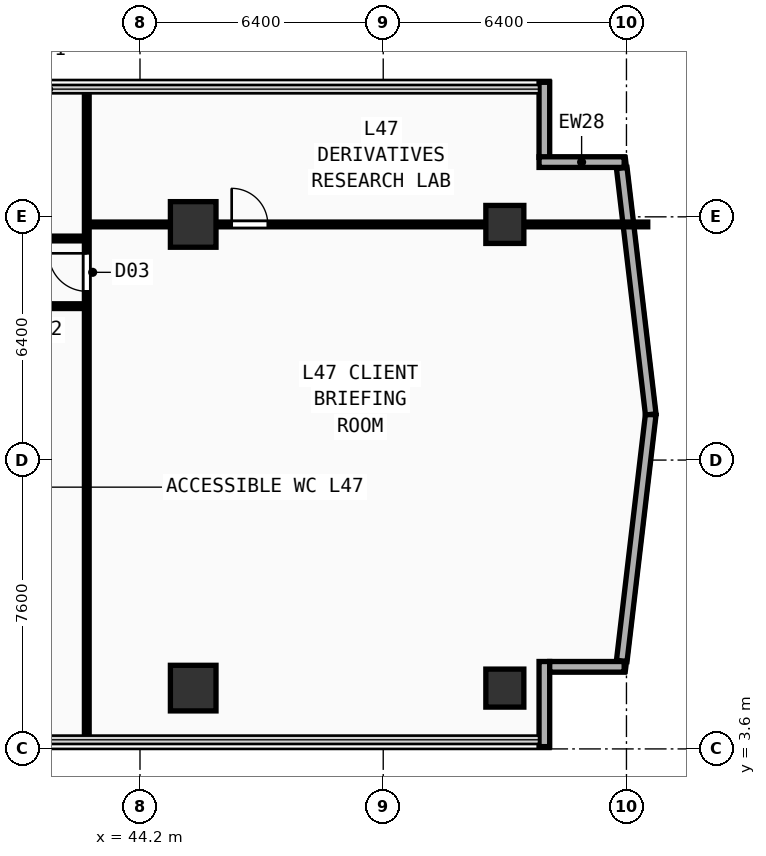
"""IFC4 building model, lengths in metres.
Left out: names, types, materials, properties, quantities, classifications, styles, units other than length and angle.
Written with IfcOpenShell. Run it as: python <this file> out.ifc"""

import sys

from ifc_helpers import new_model, si_unit, direction, frame, frame_2d, origin, origin_2d, place, context, subcontext, project, spatial, rectangle, extrude, element, fill, save


model = new_model("IFC4")
c1 = context("Model", 3, precision=1e-05, world=origin(), true_north=direction((0.0, 1.0)))
c2 = subcontext(c1, "Body", "Model", "MODEL_VIEW")
j1 = project(units=[si_unit("LENGTHUNIT", "METRE"), si_unit("PLANEANGLEUNIT", "RADIAN")], contexts=[c1])
p1 = place(None, origin())
s1 = spatial("IfcSite", under=j1, at=p1, CompositionType="ELEMENT")
p2 = place(p1, origin())
s2 = spatial("IfcBuilding", under=s1, at=p2, CompositionType="ELEMENT")
p3 = place(p2, frame((0.0, 0.0, 184.2)))
s3 = spatial("IfcBuildingStorey", under=s2, at=p3, CompositionType="ELEMENT", Elevation=184.2)
for number, where, z_axis, x_axis in (
    (1, (45.6, 5.2, 0.0), (0.0, 0.0, 1.0), (1.0, 0.0, 0.0)),
    (2, (45.6, 17.4, 0.0), (0.0, 0.0, 1.0), (1.0, 0.0, 0.0)),
):
    element("IfcColumn", number, at=place(p3, frame(where, z_axis=z_axis, x_axis=x_axis)), inside=s3, PredefinedType="COLUMN", context=c2, shape_type="SweptSolid", body=[
        extrude(rectangle(XDim=1.2, YDim=1.2, at=origin_2d()), origin(), (0.0, 0.0, 1.0), 3.56),
    ])
for number, where, z_axis, x_axis in (
    (3, (53.8, 5.2, 0.0), (0.0, 0.0, 1.0), (1.0, 0.0, 0.0)),
    (4, (53.8, 17.4, 0.0), (0.0, 0.0, 1.0), (1.0, 0.0, 0.0)),
):
    element("IfcColumn", number, at=place(p3, frame(where, z_axis=z_axis, x_axis=x_axis)), inside=s3, PredefinedType="COLUMN", context=c2, shape_type="SweptSolid", body=[
        extrude(rectangle(XDim=1.0, YDim=1.0, at=origin_2d()), origin(), (0.0, 0.0, 1.0), 3.56),
    ])
p4 = place(p3, frame((54.84, 3.66, 0.0), z_axis=(0.0, 0.0, 1.0), x_axis=(0.0, 1.0, 0.0)))
e5 = element("IfcWall", 5, at=p4, inside=s3, PredefinedType="SOLIDWALL", context=c2, shape_type="SweptSolid", body=[
    extrude(rectangle(XDim=2.24, YDim=0.28, at=frame_2d((1.12, 0.0))), origin(), (0.0, 0.0, 1.0), 3.56),
])
p5 = place(p3, frame((54.98, 5.76, 0.0), z_axis=(0.0, 0.0, 1.0), x_axis=(1.0, 0.0, 0.0)))
e6 = element("IfcWall", 6, at=p5, inside=s3, PredefinedType="SOLIDWALL", context=c2, shape_type="SweptSolid", body=[
    extrude(rectangle(XDim=1.96, YDim=0.28, at=frame_2d((0.98, 0.0))), origin(), (0.0, 0.0, 1.0), 3.56),
])
p6 = place(p3, frame((54.84, 19.165, 0.0), z_axis=(0.0, 0.0, 1.0), x_axis=(0.0, 1.0, 0.0)))
e7 = element("IfcWall", 7, at=p6, inside=s3, PredefinedType="SOLIDWALL", context=c2, shape_type="SweptSolid", body=[
    extrude(rectangle(XDim=1.975, YDim=0.28, at=frame_2d((0.987, 0.0))), origin(), (0.0, 0.0, 1.0), 3.56),
])
p7 = place(p3, frame((54.7, 19.04, 0.0), z_axis=(0.0, 0.0, 1.0), x_axis=(1.0, 0.0, 0.0)))
e8 = element("IfcWall", 8, at=p7, inside=s3, PredefinedType="SOLIDWALL", context=c2, shape_type="SweptSolid", body=[
    extrude(rectangle(XDim=2.24, YDim=0.28, at=frame_2d((1.12, 0.0))), origin(), (0.0, 0.0, 1.0), 3.56),
])
for number, where, z_axis, x_axis in (
    (9, (56.876, 5.917, 0.0), (0.0, 0.0, 1.0), (0.117, 0.993, 0.0)),
    (10, (57.639, 12.401, 0.0), (0.0, 0.0, 1.0), (-0.117, 0.993, 0.0)),
):
    element("IfcWall", number, at=place(p3, frame(where, z_axis=z_axis, x_axis=x_axis)), inside=s3, PredefinedType="SOLIDWALL", context=c2, shape_type="SweptSolid", body=[
        extrude(rectangle(XDim=6.527, YDim=0.28, at=frame_2d((3.263, 0.0))), origin(), (0.0, 0.0, 1.0), 3.56),
    ])
p8 = place(p3, frame((37.65, 15.25, 0.0), z_axis=(0.0, 0.0, 1.0), x_axis=(1.0, 0.0, 0.0)))
e11 = element("IfcWall", 11, at=p8, inside=s3, PredefinedType="PARTITIONING", context=c2, shape_type="SweptSolid", body=[
    extrude(rectangle(XDim=5.15, YDim=0.125, at=frame_2d((2.575, 0.0))), origin(), (0.0, 0.0, 1.0), 3.16),
])
p9 = place(p8, frame((1.553, 0.0, 0.0)))
e12 = element("IfcOpeningElement", 12, at=p9, cuts=e11, PredefinedType="OPENING", context=c2, shape_type="SweptSolid", body=[
    extrude(rectangle(XDim=0.95, YDim=2.15, at=frame_2d((0.475, 1.075))), frame((0.0, 0.073, 0.0), z_axis=(0.0, -1.0, 0.0), x_axis=(1.0, 0.0, 0.0)), (0.0, 0.0, 1.0), 0.145),
])
p10 = place(p3, frame((42.8, 3.84, 0.0), z_axis=(0.0, 0.0, 1.0), x_axis=(0.0, 1.0, 0.0)))
e13 = element("IfcWall", 13, at=p10, inside=s3, PredefinedType="PARTITIONING", context=c2, shape_type="SweptSolid", body=[
    extrude(rectangle(XDim=17.12, YDim=0.125, at=frame_2d((8.56, 0.0))), origin(), (0.0, 0.0, 1.0), 3.56),
])
p11 = place(p10, frame((11.8, 0.0, 0.0)))
e14 = element("IfcOpeningElement", 14, at=p11, cuts=e13, PredefinedType="OPENING", context=c2, shape_type="SweptSolid", body=[
    extrude(rectangle(XDim=1.0, YDim=2.2, at=frame_2d((0.5, 1.1))), frame((0.0, 0.073, 0.0), z_axis=(0.0, -1.0, 0.0), x_axis=(1.0, 0.0, 0.0)), (0.0, 0.0, 1.0), 0.145),
])
p12 = place(p3, frame((42.8, 17.4, 0.0), z_axis=(0.0, 0.0, 1.0), x_axis=(1.0, 0.0, 0.0)))
e15 = element("IfcWall", 15, at=p12, inside=s3, PredefinedType="PARTITIONING", context=c2, shape_type="SweptSolid", body=[
    extrude(rectangle(XDim=14.76, YDim=0.125, at=frame_2d((7.38, 0.0))), origin(), (0.0, 0.0, 1.0), 3.2),
])
p13 = place(p12, frame((3.812, 0.0, 0.0)))
e16 = element("IfcOpeningElement", 16, at=p13, cuts=e15, PredefinedType="OPENING", context=c2, shape_type="SweptSolid", body=[
    extrude(rectangle(XDim=0.95, YDim=2.15, at=frame_2d((0.475, 1.075))), frame((0.0, 0.073, 0.0), z_axis=(0.0, -1.0, 0.0), x_axis=(1.0, 0.0, 0.0)), (0.0, 0.0, 1.0), 0.145),
])
p14 = place(p3, frame((23.65, 17.03, 0.0), z_axis=(0.0, 0.0, 1.0), x_axis=(1.0, 0.0, 0.0)))
e17 = element("IfcWall", 17, at=p14, inside=s3, PredefinedType="PARTITIONING", context=c2, shape_type="SweptSolid", body=[
    extrude(rectangle(XDim=19.15, YDim=0.125, at=frame_2d((9.575, 0.0))), origin(), (0.0, 0.0, 1.0), 3.2),
])
p15 = place(p14, frame((1.555, 0.0, 0.0)))
e18 = element("IfcOpeningElement", 18, at=p15, cuts=e17, PredefinedType="OPENING", context=c2, shape_type="SweptSolid", body=[
    extrude(rectangle(XDim=0.95, YDim=2.15, at=frame_2d((0.475, 1.075))), frame((0.0, 0.073, 0.0), z_axis=(0.0, -1.0, 0.0), x_axis=(1.0, 0.0, 0.0)), (0.0, 0.0, 1.0), 0.145),
])
p16 = place(p14, frame((9.336, 0.0, 0.0)))
e19 = element("IfcOpeningElement", 19, at=p16, cuts=e17, PredefinedType="OPENING", context=c2, shape_type="SweptSolid", body=[
    extrude(rectangle(XDim=0.95, YDim=2.15, at=frame_2d((0.475, 1.075))), frame((0.0, 0.073, 0.0), z_axis=(0.0, -1.0, 0.0), x_axis=(1.0, 0.0, 0.0)), (0.0, 0.0, 1.0), 0.145),
])
p17 = place(p14, frame((15.23, 0.0, 0.0)))
e20 = element("IfcOpeningElement", 20, at=p17, cuts=e17, PredefinedType="OPENING", context=c2, shape_type="SweptSolid", body=[
    extrude(rectangle(XDim=0.95, YDim=2.15, at=frame_2d((0.475, 1.075))), frame((0.0, 0.073, 0.0), z_axis=(0.0, -1.0, 0.0), x_axis=(1.0, 0.0, 0.0)), (0.0, 0.0, 1.0), 0.145),
])
p18 = place(p11, origin())
e21 = element("IfcDoor", 21, at=p18, inside=s3, OperationType="SINGLE_SWING_RIGHT", PredefinedType="DOOR", context=c2, shape_type="SweptSolid", body=[
    extrude(rectangle(XDim=1.0, YDim=2.2, at=frame_2d((0.5, 1.1))), frame((0.0, 0.025, 0.0), z_axis=(0.0, -1.0, 0.0), x_axis=(1.0, 0.0, 0.0)), (0.0, 0.0, 1.0), 0.05),
])
fill(e14, e21)
p19 = place(p13, origin())
e22 = element("IfcDoor", 22, at=p19, inside=s3, OperationType="SINGLE_SWING_LEFT", PredefinedType="DOOR", context=c2, shape_type="SweptSolid", body=[
    extrude(rectangle(XDim=0.95, YDim=2.15, at=frame_2d((0.475, 1.075))), frame((0.0, 0.025, 0.0), z_axis=(0.0, -1.0, 0.0), x_axis=(1.0, 0.0, 0.0)), (0.0, 0.0, 1.0), 0.05),
])
fill(e16, e22)
save(model, sys.argv[1])
